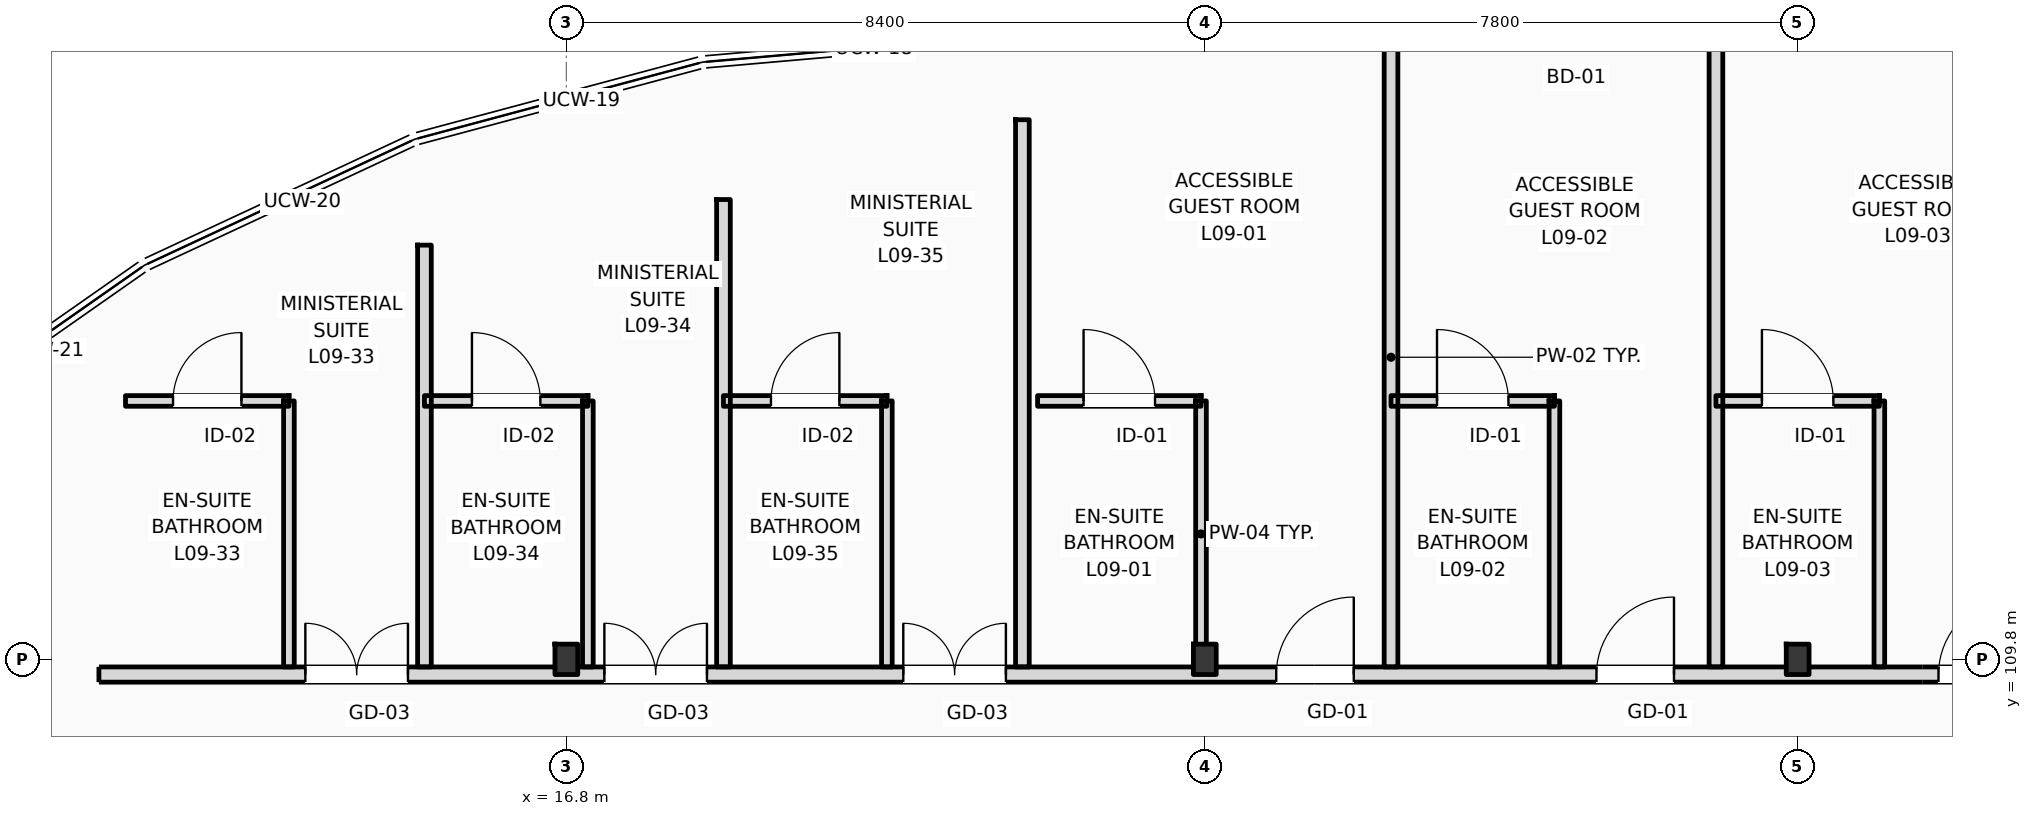
"""IFC4 building model, lengths in metres.
Left out: names, types, materials, properties, quantities, classifications, styles, units other than length and angle.
Written with IfcOpenShell. Run it as: python <this file> out.ifc"""

import sys

from ifc_helpers import new_model, si_unit, direction, frame, frame_2d, origin, origin_2d, place, context, subcontext, project, spatial, rectangle, i_section, extrude, element, fill, save


model = new_model("IFC4")
c1 = context("Model", 3, precision=1e-05, world=origin(), true_north=direction((0.0, 1.0)))
c2 = subcontext(c1, "Body", "Model", "MODEL_VIEW")
j1 = project(units=[si_unit("LENGTHUNIT", "METRE"), si_unit("PLANEANGLEUNIT", "RADIAN")], contexts=[c1])
p1 = place(None, origin())
s1 = spatial("IfcSite", under=j1, at=p1, CompositionType="ELEMENT")
p2 = place(p1, origin())
s2 = spatial("IfcBuilding", under=s1, at=p2, CompositionType="ELEMENT")
p3 = place(p2, frame((0.0, 0.0, 39.0)))
s3 = spatial("IfcBuildingStorey", under=s2, at=p3, CompositionType="ELEMENT", Elevation=39.0)
for number, where, z_axis, x_axis in (
    (1, (16.8, 109.8, 0.0), (0.0, 0.0, 1.0), (1.0, 0.0, 0.0)),
    (2, (25.2, 109.8, 0.0), (0.0, 0.0, 1.0), (1.0, 0.0, 0.0)),
    (3, (33.0, 109.8, 0.0), (0.0, 0.0, 1.0), (1.0, 0.0, 0.0)),
):
    element("IfcColumn", number, at=place(p3, frame(where, z_axis=z_axis, x_axis=x_axis)), inside=s3, PredefinedType="COLUMN", context=c2, shape_type="SweptSolid", body=[
        extrude(i_section(OverallWidth=0.3, OverallDepth=0.4, WebThickness=0.013, FlangeThickness=0.024, FilletRadius=0.027, at=origin_2d()), origin(), (0.0, 0.0, 1.0), 3.6),
    ])
p4 = place(p3, frame((10.65, 109.6, 0.0), z_axis=(0.0, 0.0, 1.0), x_axis=(1.0, 0.0, 0.0)))
e4 = element("IfcWall", 4, at=p4, inside=s3, PredefinedType="PARTITIONING", context=c2, shape_type="SweptSolid", body=[
    extrude(rectangle(XDim=84.61, YDim=0.2, at=frame_2d((42.305, 0.0))), origin(), (0.0, 0.0, 1.0), 2.82),
])
p5 = place(p4, frame((15.49, 0.0, 0.0)))
e5 = element("IfcOpeningElement", 5, at=p5, cuts=e4, PredefinedType="OPENING", context=c2, shape_type="SweptSolid", body=[
    extrude(rectangle(XDim=1.02, YDim=2.2, at=frame_2d((0.51, 1.1))), frame((0.0, 0.11, 0.0), z_axis=(0.0, -1.0, 0.0), x_axis=(1.0, 0.0, 0.0)), (0.0, 0.0, 1.0), 0.22),
])
p6 = place(p4, frame((19.703, 0.0, 0.0)))
e6 = element("IfcOpeningElement", 6, at=p6, cuts=e4, PredefinedType="OPENING", context=c2, shape_type="SweptSolid", body=[
    extrude(rectangle(XDim=1.02, YDim=2.2, at=frame_2d((0.51, 1.1))), frame((0.0, 0.11, 0.0), z_axis=(0.0, -1.0, 0.0), x_axis=(1.0, 0.0, 0.0)), (0.0, 0.0, 1.0), 0.22),
])
p7 = place(p4, frame((24.203, 0.0, 0.0)))
e7 = element("IfcOpeningElement", 7, at=p7, cuts=e4, PredefinedType="OPENING", context=c2, shape_type="SweptSolid", body=[
    extrude(rectangle(XDim=1.02, YDim=2.2, at=frame_2d((0.51, 1.1))), frame((0.0, 0.11, 0.0), z_axis=(0.0, -1.0, 0.0), x_axis=(1.0, 0.0, 0.0)), (0.0, 0.0, 1.0), 0.22),
])
p8 = place(p4, frame((26.552, 0.0, 0.0)))
e8 = element("IfcOpeningElement", 8, at=p8, cuts=e4, PredefinedType="OPENING", context=c2, shape_type="SweptSolid", body=[
    extrude(rectangle(XDim=1.02, YDim=2.2, at=frame_2d((0.51, 1.1))), frame((0.0, 0.11, 0.0), z_axis=(0.0, -1.0, 0.0), x_axis=(1.0, 0.0, 0.0)), (0.0, 0.0, 1.0), 0.22),
])
p9 = place(p4, frame((33.233, 0.0, 0.0)))
e9 = element("IfcOpeningElement", 9, at=p9, cuts=e4, PredefinedType="OPENING", context=c2, shape_type="SweptSolid", body=[
    extrude(rectangle(XDim=0.96, YDim=2.2, at=frame_2d((0.48, 1.1))), frame((0.0, 0.11, 0.0), z_axis=(0.0, -1.0, 0.0), x_axis=(1.0, 0.0, 0.0)), (0.0, 0.0, 1.0), 0.22),
])
p10 = place(p4, frame((35.583, 0.0, 0.0)))
e10 = element("IfcOpeningElement", 10, at=p10, cuts=e4, PredefinedType="OPENING", context=c2, shape_type="SweptSolid", body=[
    extrude(rectangle(XDim=0.96, YDim=2.2, at=frame_2d((0.48, 1.1))), frame((0.0, 0.11, 0.0), z_axis=(0.0, -1.0, 0.0), x_axis=(1.0, 0.0, 0.0)), (0.0, 0.0, 1.0), 0.22),
])
p11 = place(p4, frame((42.233, 0.0, 0.0)))
e11 = element("IfcOpeningElement", 11, at=p11, cuts=e4, PredefinedType="OPENING", context=c2, shape_type="SweptSolid", body=[
    extrude(rectangle(XDim=0.96, YDim=2.2, at=frame_2d((0.48, 1.1))), frame((0.0, 0.11, 0.0), z_axis=(0.0, -1.0, 0.0), x_axis=(1.0, 0.0, 0.0)), (0.0, 0.0, 1.0), 0.22),
])
p12 = place(p4, frame((46.983, 0.0, 0.0)))
e12 = element("IfcOpeningElement", 12, at=p12, cuts=e4, PredefinedType="OPENING", context=c2, shape_type="SweptSolid", body=[
    extrude(rectangle(XDim=0.96, YDim=2.2, at=frame_2d((0.48, 1.1))), frame((0.0, 0.11, 0.0), z_axis=(0.0, -1.0, 0.0), x_axis=(1.0, 0.0, 0.0)), (0.0, 0.0, 1.0), 0.22),
])
p13 = place(p4, frame((51.233, 0.0, 0.0)))
e13 = element("IfcOpeningElement", 13, at=p13, cuts=e4, PredefinedType="OPENING", context=c2, shape_type="SweptSolid", body=[
    extrude(rectangle(XDim=0.96, YDim=2.2, at=frame_2d((0.48, 1.1))), frame((0.0, 0.11, 0.0), z_axis=(0.0, -1.0, 0.0), x_axis=(1.0, 0.0, 0.0)), (0.0, 0.0, 1.0), 0.22),
])
p14 = place(p4, frame((55.733, 0.0, 0.0)))
e14 = element("IfcOpeningElement", 14, at=p14, cuts=e4, PredefinedType="OPENING", context=c2, shape_type="SweptSolid", body=[
    extrude(rectangle(XDim=0.96, YDim=2.2, at=frame_2d((0.48, 1.1))), frame((0.0, 0.11, 0.0), z_axis=(0.0, -1.0, 0.0), x_axis=(1.0, 0.0, 0.0)), (0.0, 0.0, 1.0), 0.22),
])
p15 = place(p4, frame((58.083, 0.0, 0.0)))
e15 = element("IfcOpeningElement", 15, at=p15, cuts=e4, PredefinedType="OPENING", context=c2, shape_type="SweptSolid", body=[
    extrude(rectangle(XDim=0.96, YDim=2.2, at=frame_2d((0.48, 1.1))), frame((0.0, 0.11, 0.0), z_axis=(0.0, -1.0, 0.0), x_axis=(1.0, 0.0, 0.0)), (0.0, 0.0, 1.0), 0.22),
])
p16 = place(p4, frame((64.732, 0.0, 0.0)))
e16 = element("IfcOpeningElement", 16, at=p16, cuts=e4, PredefinedType="OPENING", context=c2, shape_type="SweptSolid", body=[
    extrude(rectangle(XDim=0.96, YDim=2.2, at=frame_2d((0.48, 1.1))), frame((0.0, 0.11, 0.0), z_axis=(0.0, -1.0, 0.0), x_axis=(1.0, 0.0, 0.0)), (0.0, 0.0, 1.0), 0.22),
])
p17 = place(p4, frame((66.832, 0.0, 0.0)))
e17 = element("IfcOpeningElement", 17, at=p17, cuts=e4, PredefinedType="OPENING", context=c2, shape_type="SweptSolid", body=[
    extrude(rectangle(XDim=0.96, YDim=2.2, at=frame_2d((0.48, 1.1))), frame((0.0, 0.11, 0.0), z_axis=(0.0, -1.0, 0.0), x_axis=(1.0, 0.0, 0.0)), (0.0, 0.0, 1.0), 0.22),
])
p18 = place(p4, frame((73.732, 0.0, 0.0)))
e18 = element("IfcOpeningElement", 18, at=p18, cuts=e4, PredefinedType="OPENING", context=c2, shape_type="SweptSolid", body=[
    extrude(rectangle(XDim=0.96, YDim=2.2, at=frame_2d((0.48, 1.1))), frame((0.0, 0.11, 0.0), z_axis=(0.0, -1.0, 0.0), x_axis=(1.0, 0.0, 0.0)), (0.0, 0.0, 1.0), 0.22),
])
p19 = place(p4, frame((78.233, 0.0, 0.0)))
e19 = element("IfcOpeningElement", 19, at=p19, cuts=e4, PredefinedType="OPENING", context=c2, shape_type="SweptSolid", body=[
    extrude(rectangle(XDim=0.96, YDim=2.2, at=frame_2d((0.48, 1.1))), frame((0.0, 0.11, 0.0), z_axis=(0.0, -1.0, 0.0), x_axis=(1.0, 0.0, 0.0)), (0.0, 0.0, 1.0), 0.22),
])
p20 = place(p4, frame((80.62, 0.0, 0.0)))
e20 = element("IfcOpeningElement", 20, at=p20, cuts=e4, PredefinedType="OPENING", context=c2, shape_type="SweptSolid", body=[
    extrude(rectangle(XDim=0.96, YDim=2.2, at=frame_2d((0.48, 1.1))), frame((0.0, 0.11, 0.0), z_axis=(0.0, -1.0, 0.0), x_axis=(1.0, 0.0, 0.0)), (0.0, 0.0, 1.0), 0.22),
])
p21 = place(p4, frame((2.716, 0.0, 0.0)))
e21 = element("IfcOpeningElement", 21, at=p21, cuts=e4, PredefinedType="OPENING", context=c2, shape_type="SweptSolid", body=[
    extrude(rectangle(XDim=1.35, YDim=2.25, at=frame_2d((0.675, 1.125))), frame((0.0, 0.11, 0.0), z_axis=(0.0, -1.0, 0.0), x_axis=(1.0, 0.0, 0.0)), (0.0, 0.0, 1.0), 0.22),
])
p22 = place(p4, frame((6.65, 0.0, 0.0)))
e22 = element("IfcOpeningElement", 22, at=p22, cuts=e4, PredefinedType="OPENING", context=c2, shape_type="SweptSolid", body=[
    extrude(rectangle(XDim=1.35, YDim=2.25, at=frame_2d((0.675, 1.125))), frame((0.0, 0.11, 0.0), z_axis=(0.0, -1.0, 0.0), x_axis=(1.0, 0.0, 0.0)), (0.0, 0.0, 1.0), 0.22),
])
p23 = place(p4, frame((10.583, 0.0, 0.0)))
e23 = element("IfcOpeningElement", 23, at=p23, cuts=e4, PredefinedType="OPENING", context=c2, shape_type="SweptSolid", body=[
    extrude(rectangle(XDim=1.35, YDim=2.25, at=frame_2d((0.675, 1.125))), frame((0.0, 0.11, 0.0), z_axis=(0.0, -1.0, 0.0), x_axis=(1.0, 0.0, 0.0)), (0.0, 0.0, 1.0), 0.22),
])
p24 = place(p3, frame((27.65, 109.7, 0.0), z_axis=(0.0, 0.0, 1.0), x_axis=(0.0, 1.0, 0.0)))
e24 = element("IfcWall", 24, at=p24, inside=s3, PredefinedType="PARTITIONING", context=c2, shape_type="SweptSolid", body=[
    extrude(rectangle(XDim=8.15, YDim=0.18, at=frame_2d((4.075, 0.0))), origin(), (0.0, 0.0, 1.0), 3.07),
])
p25 = place(p3, frame((25.15, 109.7, 0.0), z_axis=(0.0, 0.0, 1.0), x_axis=(0.0, 1.0, 0.0)))
e25 = element("IfcWall", 25, at=p25, inside=s3, PredefinedType="PARTITIONING", context=c2, shape_type="SweptSolid", body=[
    extrude(rectangle(XDim=3.5, YDim=0.14, at=frame_2d((1.75, 0.0))), origin(), (0.0, 0.0, 1.0), 3.01),
])
p26 = place(p3, frame((23.0, 113.2, 0.0), z_axis=(0.0, 0.0, 1.0), x_axis=(1.0, 0.0, 0.0)))
e26 = element("IfcWall", 26, at=p26, inside=s3, PredefinedType="PARTITIONING", context=c2, shape_type="SweptSolid", body=[
    extrude(rectangle(XDim=2.15, YDim=0.14, at=frame_2d((1.075, 0.0))), origin(), (0.0, 0.0, 1.0), 3.38),
])
p27 = place(p26, frame((0.605, 0.0, 0.0)))
e27 = element("IfcOpeningElement", 27, at=p27, cuts=e26, PredefinedType="OPENING", context=c2, shape_type="SweptSolid", body=[
    extrude(rectangle(XDim=0.94, YDim=2.15, at=frame_2d((0.47, 1.075))), frame((0.0, 0.08, 0.0), z_axis=(0.0, -1.0, 0.0), x_axis=(1.0, 0.0, 0.0)), (0.0, 0.0, 1.0), 0.16),
])
p28 = place(p3, frame((31.925, 109.7, 0.0), z_axis=(0.0, 0.0, 1.0), x_axis=(0.0, 1.0, 0.0)))
e28 = element("IfcWall", 28, at=p28, inside=s3, PredefinedType="PARTITIONING", context=c2, shape_type="SweptSolid", body=[
    extrude(rectangle(XDim=8.15, YDim=0.18, at=frame_2d((4.075, 0.0))), origin(), (0.0, 0.0, 1.0), 3.38),
])
p29 = place(p3, frame((29.8, 109.7, 0.0), z_axis=(0.0, 0.0, 1.0), x_axis=(0.0, 1.0, 0.0)))
e29 = element("IfcWall", 29, at=p29, inside=s3, PredefinedType="PARTITIONING", context=c2, shape_type="SweptSolid", body=[
    extrude(rectangle(XDim=3.5, YDim=0.14, at=frame_2d((1.75, 0.0))), origin(), (0.0, 0.0, 1.0), 3.38),
])
p30 = place(p3, frame((27.65, 113.2, 0.0), z_axis=(0.0, 0.0, 1.0), x_axis=(1.0, 0.0, 0.0)))
e30 = element("IfcWall", 30, at=p30, inside=s3, PredefinedType="PARTITIONING", context=c2, shape_type="SweptSolid", body=[
    extrude(rectangle(XDim=2.15, YDim=0.14, at=frame_2d((1.075, 0.0))), origin(), (0.0, 0.0, 1.0), 3.38),
])
p31 = place(p30, frame((0.605, 0.0, 0.0)))
e31 = element("IfcOpeningElement", 31, at=p31, cuts=e30, PredefinedType="OPENING", context=c2, shape_type="SweptSolid", body=[
    extrude(rectangle(XDim=0.94, YDim=2.15, at=frame_2d((0.47, 1.075))), frame((0.0, 0.08, 0.0), z_axis=(0.0, -1.0, 0.0), x_axis=(1.0, 0.0, 0.0)), (0.0, 0.0, 1.0), 0.16),
])
p32 = place(p3, frame((34.075, 109.7, 0.0), z_axis=(0.0, 0.0, 1.0), x_axis=(0.0, 1.0, 0.0)))
e32 = element("IfcWall", 32, at=p32, inside=s3, PredefinedType="PARTITIONING", context=c2, shape_type="SweptSolid", body=[
    extrude(rectangle(XDim=3.5, YDim=0.14, at=frame_2d((1.75, 0.0))), origin(), (0.0, 0.0, 1.0), 3.38),
])
p33 = place(p3, frame((31.925, 113.2, 0.0), z_axis=(0.0, 0.0, 1.0), x_axis=(1.0, 0.0, 0.0)))
e33 = element("IfcWall", 33, at=p33, inside=s3, PredefinedType="PARTITIONING", context=c2, shape_type="SweptSolid", body=[
    extrude(rectangle(XDim=2.15, YDim=0.14, at=frame_2d((1.075, 0.0))), origin(), (0.0, 0.0, 1.0), 3.38),
])
p34 = place(p33, frame((0.605, 0.0, 0.0)))
e34 = element("IfcOpeningElement", 34, at=p34, cuts=e33, PredefinedType="OPENING", context=c2, shape_type="SweptSolid", body=[
    extrude(rectangle(XDim=0.94, YDim=2.15, at=frame_2d((0.47, 1.075))), frame((0.0, 0.08, 0.0), z_axis=(0.0, -1.0, 0.0), x_axis=(1.0, 0.0, 0.0)), (0.0, 0.0, 1.0), 0.16),
])
p35 = place(p3, frame((14.933, 109.7, 0.0), z_axis=(0.0, 0.0, 1.0), x_axis=(0.0, 1.0, 0.0)))
e35 = element("IfcWall", 35, at=p35, inside=s3, PredefinedType="PARTITIONING", context=c2, shape_type="SweptSolid", body=[
    extrude(rectangle(XDim=5.55, YDim=0.18, at=frame_2d((2.775, 0.0))), origin(), (0.0, 0.0, 1.0), 3.38),
])
p36 = place(p3, frame((13.15, 109.7, 0.0), z_axis=(0.0, 0.0, 1.0), x_axis=(0.0, 1.0, 0.0)))
e36 = element("IfcWall", 36, at=p36, inside=s3, PredefinedType="PARTITIONING", context=c2, shape_type="SweptSolid", body=[
    extrude(rectangle(XDim=3.5, YDim=0.14, at=frame_2d((1.75, 0.0))), origin(), (0.0, 0.0, 1.0), 3.38),
])
p37 = place(p3, frame((11.0, 113.2, 0.0), z_axis=(0.0, 0.0, 1.0), x_axis=(1.0, 0.0, 0.0)))
e37 = element("IfcWall", 37, at=p37, inside=s3, PredefinedType="PARTITIONING", context=c2, shape_type="SweptSolid", body=[
    extrude(rectangle(XDim=2.15, YDim=0.14, at=frame_2d((1.075, 0.0))), origin(), (0.0, 0.0, 1.0), 3.38),
])
p38 = place(p37, frame((0.625, 0.0, 0.0)))
e38 = element("IfcOpeningElement", 38, at=p38, cuts=e37, PredefinedType="OPENING", context=c2, shape_type="SweptSolid", body=[
    extrude(rectangle(XDim=0.9, YDim=2.1, at=frame_2d((0.45, 1.05))), frame((0.0, 0.08, 0.0), z_axis=(0.0, -1.0, 0.0), x_axis=(1.0, 0.0, 0.0)), (0.0, 0.0, 1.0), 0.16),
])
p39 = place(p3, frame((18.867, 109.7, 0.0), z_axis=(0.0, 0.0, 1.0), x_axis=(0.0, 1.0, 0.0)))
e39 = element("IfcWall", 39, at=p39, inside=s3, PredefinedType="PARTITIONING", context=c2, shape_type="SweptSolid", body=[
    extrude(rectangle(XDim=6.15, YDim=0.18, at=frame_2d((3.075, 0.0))), origin(), (0.0, 0.0, 1.0), 3.38),
])
p40 = place(p3, frame((17.083, 109.7, 0.0), z_axis=(0.0, 0.0, 1.0), x_axis=(0.0, 1.0, 0.0)))
e40 = element("IfcWall", 40, at=p40, inside=s3, PredefinedType="PARTITIONING", context=c2, shape_type="SweptSolid", body=[
    extrude(rectangle(XDim=3.5, YDim=0.14, at=frame_2d((1.75, 0.0))), origin(), (0.0, 0.0, 1.0), 3.38),
])
p41 = place(p3, frame((14.933, 113.2, 0.0), z_axis=(0.0, 0.0, 1.0), x_axis=(1.0, 0.0, 0.0)))
e41 = element("IfcWall", 41, at=p41, inside=s3, PredefinedType="PARTITIONING", context=c2, shape_type="SweptSolid", body=[
    extrude(rectangle(XDim=2.15, YDim=0.14, at=frame_2d((1.075, 0.0))), origin(), (0.0, 0.0, 1.0), 3.38),
])
p42 = place(p41, frame((0.625, 0.0, 0.0)))
e42 = element("IfcOpeningElement", 42, at=p42, cuts=e41, PredefinedType="OPENING", context=c2, shape_type="SweptSolid", body=[
    extrude(rectangle(XDim=0.9, YDim=2.1, at=frame_2d((0.45, 1.05))), frame((0.0, 0.08, 0.0), z_axis=(0.0, -1.0, 0.0), x_axis=(1.0, 0.0, 0.0)), (0.0, 0.0, 1.0), 0.16),
])
p43 = place(p3, frame((22.8, 109.7, 0.0), z_axis=(0.0, 0.0, 1.0), x_axis=(0.0, 1.0, 0.0)))
e43 = element("IfcWall", 43, at=p43, inside=s3, PredefinedType="PARTITIONING", context=c2, shape_type="SweptSolid", body=[
    extrude(rectangle(XDim=7.2, YDim=0.18, at=frame_2d((3.6, 0.0))), origin(), (0.0, 0.0, 1.0), 3.38),
])
p44 = place(p3, frame((21.017, 109.7, 0.0), z_axis=(0.0, 0.0, 1.0), x_axis=(0.0, 1.0, 0.0)))
e44 = element("IfcWall", 44, at=p44, inside=s3, PredefinedType="PARTITIONING", context=c2, shape_type="SweptSolid", body=[
    extrude(rectangle(XDim=3.5, YDim=0.14, at=frame_2d((1.75, 0.0))), origin(), (0.0, 0.0, 1.0), 3.38),
])
p45 = place(p3, frame((18.867, 113.2, 0.0), z_axis=(0.0, 0.0, 1.0), x_axis=(1.0, 0.0, 0.0)))
e45 = element("IfcWall", 45, at=p45, inside=s3, PredefinedType="PARTITIONING", context=c2, shape_type="SweptSolid", body=[
    extrude(rectangle(XDim=2.15, YDim=0.14, at=frame_2d((1.075, 0.0))), origin(), (0.0, 0.0, 1.0), 3.38),
])
p46 = place(p45, frame((0.625, 0.0, 0.0)))
e46 = element("IfcOpeningElement", 46, at=p46, cuts=e45, PredefinedType="OPENING", context=c2, shape_type="SweptSolid", body=[
    extrude(rectangle(XDim=0.9, YDim=2.1, at=frame_2d((0.45, 1.05))), frame((0.0, 0.08, 0.0), z_axis=(0.0, -1.0, 0.0), x_axis=(1.0, 0.0, 0.0)), (0.0, 0.0, 1.0), 0.16),
])
p47 = place(p5, origin())
e47 = element("IfcDoor", 47, at=p47, inside=s3, OperationType="SINGLE_SWING_RIGHT", PredefinedType="DOOR", context=c2, shape_type="SweptSolid", body=[
    extrude(rectangle(XDim=1.02, YDim=2.2, at=frame_2d((0.51, 1.1))), frame((0.0, 0.025, 0.0), z_axis=(0.0, -1.0, 0.0), x_axis=(1.0, 0.0, 0.0)), (0.0, 0.0, 1.0), 0.05),
])
fill(e5, e47)
p48 = place(p27, origin())
e48 = element("IfcDoor", 48, at=p48, inside=s3, OperationType="SINGLE_SWING_LEFT", PredefinedType="DOOR", context=c2, shape_type="SweptSolid", body=[
    extrude(rectangle(XDim=0.94, YDim=2.15, at=frame_2d((0.47, 1.075))), frame((0.0, 0.025, 0.0), z_axis=(0.0, -1.0, 0.0), x_axis=(1.0, 0.0, 0.0)), (0.0, 0.0, 1.0), 0.05),
])
fill(e27, e48)
p49 = place(p6, origin())
e49 = element("IfcDoor", 49, at=p49, inside=s3, OperationType="SINGLE_SWING_RIGHT", PredefinedType="DOOR", context=c2, shape_type="SweptSolid", body=[
    extrude(rectangle(XDim=1.02, YDim=2.2, at=frame_2d((0.51, 1.1))), frame((0.0, 0.025, 0.0), z_axis=(0.0, -1.0, 0.0), x_axis=(1.0, 0.0, 0.0)), (0.0, 0.0, 1.0), 0.05),
])
fill(e6, e49)
p50 = place(p31, origin())
e50 = element("IfcDoor", 50, at=p50, inside=s3, OperationType="SINGLE_SWING_LEFT", PredefinedType="DOOR", context=c2, shape_type="SweptSolid", body=[
    extrude(rectangle(XDim=0.94, YDim=2.15, at=frame_2d((0.47, 1.075))), frame((0.0, 0.025, 0.0), z_axis=(0.0, -1.0, 0.0), x_axis=(1.0, 0.0, 0.0)), (0.0, 0.0, 1.0), 0.05),
])
fill(e31, e50)
p51 = place(p7, origin())
e51 = element("IfcDoor", 51, at=p51, inside=s3, OperationType="SINGLE_SWING_RIGHT", PredefinedType="DOOR", context=c2, shape_type="SweptSolid", body=[
    extrude(rectangle(XDim=1.02, YDim=2.2, at=frame_2d((0.51, 1.1))), frame((0.0, 0.025, 0.0), z_axis=(0.0, -1.0, 0.0), x_axis=(1.0, 0.0, 0.0)), (0.0, 0.0, 1.0), 0.05),
])
fill(e7, e51)
p52 = place(p34, origin())
e52 = element("IfcDoor", 52, at=p52, inside=s3, OperationType="SINGLE_SWING_LEFT", PredefinedType="DOOR", context=c2, shape_type="SweptSolid", body=[
    extrude(rectangle(XDim=0.94, YDim=2.15, at=frame_2d((0.47, 1.075))), frame((0.0, 0.025, 0.0), z_axis=(0.0, -1.0, 0.0), x_axis=(1.0, 0.0, 0.0)), (0.0, 0.0, 1.0), 0.05),
])
fill(e34, e52)
p53 = place(p21, origin())
e53 = element("IfcDoor", 53, at=p53, inside=s3, OperationType="DOUBLE_SWING_LEFT", PredefinedType="DOOR", context=c2, shape_type="SweptSolid", body=[
    extrude(rectangle(XDim=1.35, YDim=2.25, at=frame_2d((0.675, 1.125))), frame((0.0, 0.025, 0.0), z_axis=(0.0, -1.0, 0.0), x_axis=(1.0, 0.0, 0.0)), (0.0, 0.0, 1.0), 0.05),
])
fill(e21, e53)
p54 = place(p38, origin())
e54 = element("IfcDoor", 54, at=p54, inside=s3, OperationType="SINGLE_SWING_RIGHT", PredefinedType="DOOR", context=c2, shape_type="SweptSolid", body=[
    extrude(rectangle(XDim=0.9, YDim=2.1, at=frame_2d((0.45, 1.05))), frame((0.0, 0.025, 0.0), z_axis=(0.0, -1.0, 0.0), x_axis=(1.0, 0.0, 0.0)), (0.0, 0.0, 1.0), 0.05),
])
fill(e38, e54)
p55 = place(p22, origin())
e55 = element("IfcDoor", 55, at=p55, inside=s3, OperationType="DOUBLE_SWING_LEFT", PredefinedType="DOOR", context=c2, shape_type="SweptSolid", body=[
    extrude(rectangle(XDim=1.35, YDim=2.25, at=frame_2d((0.675, 1.125))), frame((0.0, 0.025, 0.0), z_axis=(0.0, -1.0, 0.0), x_axis=(1.0, 0.0, 0.0)), (0.0, 0.0, 1.0), 0.05),
])
fill(e22, e55)
p56 = place(p42, origin())
e56 = element("IfcDoor", 56, at=p56, inside=s3, OperationType="SINGLE_SWING_LEFT", PredefinedType="DOOR", context=c2, shape_type="SweptSolid", body=[
    extrude(rectangle(XDim=0.9, YDim=2.1, at=frame_2d((0.45, 1.05))), frame((0.0, 0.025, 0.0), z_axis=(0.0, -1.0, 0.0), x_axis=(1.0, 0.0, 0.0)), (0.0, 0.0, 1.0), 0.05),
])
fill(e42, e56)
p57 = place(p23, origin())
e57 = element("IfcDoor", 57, at=p57, inside=s3, OperationType="DOUBLE_SWING_LEFT", PredefinedType="DOOR", context=c2, shape_type="SweptSolid", body=[
    extrude(rectangle(XDim=1.35, YDim=2.25, at=frame_2d((0.675, 1.125))), frame((0.0, 0.025, 0.0), z_axis=(0.0, -1.0, 0.0), x_axis=(1.0, 0.0, 0.0)), (0.0, 0.0, 1.0), 0.05),
])
fill(e23, e57)
p58 = place(p46, origin())
e58 = element("IfcDoor", 58, at=p58, inside=s3, OperationType="SINGLE_SWING_RIGHT", PredefinedType="DOOR", context=c2, shape_type="SweptSolid", body=[
    extrude(rectangle(XDim=0.9, YDim=2.1, at=frame_2d((0.45, 1.05))), frame((0.0, 0.025, 0.0), z_axis=(0.0, -1.0, 0.0), x_axis=(1.0, 0.0, 0.0)), (0.0, 0.0, 1.0), 0.05),
])
fill(e46, e58)
save(model, sys.argv[1])
